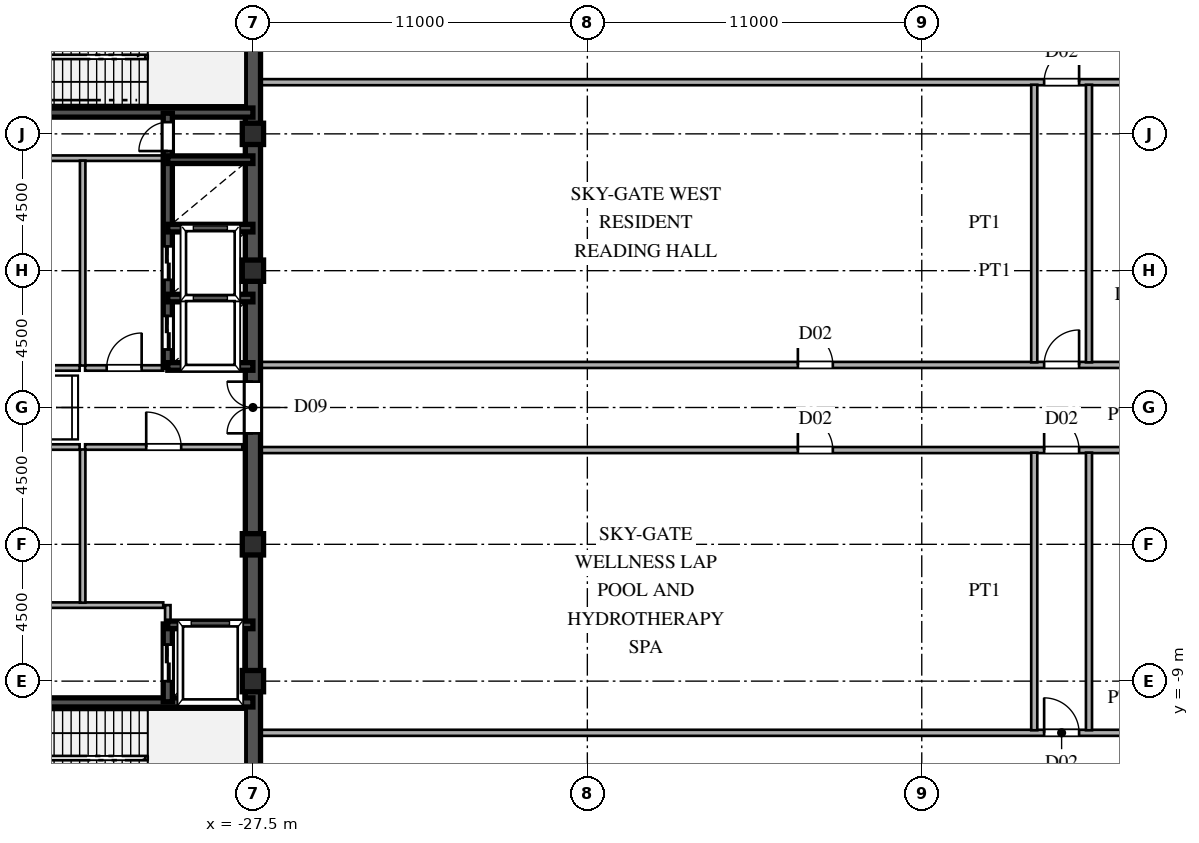
"""IFC4 building model, lengths in metres.
Left out: names, types, materials, properties, quantities, classifications, styles, units other than length and angle.
Written with IfcOpenShell. Run it as: python <this file> out.ifc"""

import sys

from ifc_helpers import new_model, si_unit, direction, frame, frame_2d, origin, origin_2d, place, context, subcontext, project, spatial, rectangle, hollow_rectangle, extrude, source, transform, mapped, element, fill, save


model = new_model("IFC4")
c1 = context("Model", 3, precision=1e-05, world=origin(), true_north=direction((0.0, 1.0)))
c2 = subcontext(c1, "Body", "Model", "MODEL_VIEW")
j1 = project(units=[si_unit("LENGTHUNIT", "METRE"), si_unit("PLANEANGLEUNIT", "RADIAN")], contexts=[c1])
p1 = place(None, origin())
s1 = spatial("IfcSite", under=j1, at=p1, CompositionType="ELEMENT")
p2 = place(p1, origin())
s2 = spatial("IfcBuilding", under=s1, at=p2, CompositionType="ELEMENT")
p3 = place(p2, frame((0.0, 0.0, 229.8)))
s3 = spatial("IfcBuildingStorey", under=s2, at=p3, CompositionType="ELEMENT", Elevation=229.8)
m1 = source(origin(), c2, "Body", "SweptSolid", [
    extrude(hollow_rectangle(XDim=0.7, YDim=0.7, WallThickness=0.03, at=origin_2d()), origin(), (0.0, 0.0, 1.0), 4.8),
])
for number, where, z_axis, x_axis in (
    (1, (-27.5, -9.0, 0.0), (0.0, 0.0, 1.0), (1.0, 0.0, 0.0)),
    (2, (-27.5, -4.5, 0.0), (0.0, 0.0, 1.0), (1.0, 0.0, 0.0)),
    (3, (-27.5, 4.5, 0.0), (0.0, 0.0, 1.0), (1.0, 0.0, 0.0)),
    (4, (-27.5, 9.0, 0.0), (0.0, 0.0, 1.0), (1.0, 0.0, 0.0)),
):
    element("IfcColumn", number, at=place(p3, frame(where, z_axis=z_axis, x_axis=x_axis)), inside=s3, PredefinedType="COLUMN", context=c2, shape_type="MappedRepresentation", body=[
        mapped(m1, transform((0.0, 0.0, 0.0), scale=1.0)),
    ])
for number, where, z_axis, x_axis in (
    (5, (-27.5, -13.5, 0.0), (0.0, 0.0, 1.0), (0.0, 1.0, 0.0)),
    (6, (-27.5, 1.3, 0.0), (0.0, 0.0, 1.0), (0.0, 1.0, 0.0)),
):
    element("IfcWall", number, at=place(p3, frame(where, z_axis=z_axis, x_axis=x_axis)), inside=s3, PredefinedType="SHEAR", context=c2, shape_type="SweptSolid", body=[
        extrude(rectangle(XDim=12.2, YDim=0.5, at=frame_2d((6.1, 0.0))), origin(), (0.0, 0.0, 1.0), 4.54),
    ])
p4 = place(p3, frame((-27.5, -1.3, 0.0), z_axis=(0.0, 0.0, 1.0), x_axis=(0.0, 1.0, 0.0)))
e7 = element("IfcWall", 7, at=p4, inside=s3, PredefinedType="SHEAR", context=c2, shape_type="SweptSolid", body=[
    extrude(rectangle(XDim=2.6, YDim=0.5, at=frame_2d((1.3, 0.0))), origin(), (0.0, 0.0, 1.0), 4.54),
])
p5 = place(p4, frame((0.45, 0.0, 0.0)))
e8 = element("IfcOpeningElement", 8, at=p5, cuts=e7, PredefinedType="OPENING", context=c2, shape_type="SweptSolid", body=[
    extrude(rectangle(XDim=1.7, YDim=2.35, at=frame_2d((0.85, 1.175))), frame((0.0, 0.26, 0.0), z_axis=(0.0, -1.0, 0.0), x_axis=(1.0, 0.0, 0.0)), (0.0, 0.0, 1.0), 0.52),
])
p6 = place(p3, frame((-36.5, -9.7, 0.0), z_axis=(0.0, 0.0, 1.0), x_axis=(1.0, 0.0, 0.0)))
e9 = element("IfcWall", 9, at=p6, inside=s3, PredefinedType="SHEAR", context=c2, shape_type="SweptSolid", body=[
    extrude(rectangle(XDim=9.0, YDim=0.3, at=frame_2d((4.5, 0.0))), origin(), (0.0, 0.0, 1.0), 4.54),
])
p7 = place(p6, frame((0.6, 0.0, 0.0)))
e10 = element("IfcOpeningElement", 10, at=p7, cuts=e9, PredefinedType="OPENING", context=c2, shape_type="SweptSolid", body=[
    extrude(rectangle(XDim=1.1, YDim=2.2, at=frame_2d((0.55, 1.1))), frame((0.0, 0.16, 0.0), z_axis=(0.0, -1.0, 0.0), x_axis=(1.0, 0.0, 0.0)), (0.0, 0.0, 1.0), 0.32),
])
p8 = place(p3, frame((-36.5, 9.7, 0.0), z_axis=(0.0, 0.0, 1.0), x_axis=(1.0, 0.0, 0.0)))
e11 = element("IfcWall", 11, at=p8, inside=s3, PredefinedType="SHEAR", context=c2, shape_type="SweptSolid", body=[
    extrude(rectangle(XDim=9.0, YDim=0.3, at=frame_2d((4.5, 0.0))), origin(), (0.0, 0.0, 1.0), 4.54),
])
p9 = place(p8, frame((0.6, 0.0, 0.0)))
e12 = element("IfcOpeningElement", 12, at=p9, cuts=e11, PredefinedType="OPENING", context=c2, shape_type="SweptSolid", body=[
    extrude(rectangle(XDim=1.1, YDim=2.2, at=frame_2d((0.55, 1.1))), frame((0.0, 0.16, 0.0), z_axis=(0.0, -1.0, 0.0), x_axis=(1.0, 0.0, 0.0)), (0.0, 0.0, 1.0), 0.32),
])
for number, where, z_axis, x_axis in (
    (13, (-30.3, -7.15, 0.0), (0.0, 0.0, 1.0), (1.0, 0.0, 0.0)),
    (14, (-30.3, 1.35, 0.0), (0.0, 0.0, 1.0), (1.0, 0.0, 0.0)),
    (15, (-30.3, 3.6, 0.0), (0.0, 0.0, 1.0), (1.0, 0.0, 0.0)),
    (16, (-30.3, 5.9, 0.0), (0.0, 0.0, 1.0), (1.0, 0.0, 0.0)),
    (17, (-30.3, 8.15, 0.0), (0.0, 0.0, 1.0), (1.0, 0.0, 0.0)),
):
    element("IfcWall", number, at=place(p3, frame(where, z_axis=z_axis, x_axis=x_axis)), inside=s3, PredefinedType="SHEAR", context=c2, shape_type="SweptSolid", body=[
        extrude(rectangle(XDim=2.8, YDim=0.25, at=frame_2d((1.4, 0.0))), origin(), (0.0, 0.0, 1.0), 4.54),
    ])
p10 = place(p3, frame((-30.3, -9.68, 0.0), z_axis=(0.0, 0.0, 1.0), x_axis=(0.0, 1.0, 0.0)))
e18 = element("IfcWall", 18, at=p10, inside=s3, PredefinedType="SHEAR", context=c2, shape_type="SweptSolid", body=[
    extrude(rectangle(XDim=2.56, YDim=0.3, at=frame_2d((1.28, 0.0))), origin(), (0.0, 0.0, 1.0), 4.54),
])
p11 = place(p10, frame((0.68, 0.0, 0.0)))
e19 = element("IfcOpeningElement", 19, at=p11, cuts=e18, PredefinedType="OPENING", context=c2, shape_type="SweptSolid", body=[
    extrude(rectangle(XDim=1.2, YDim=2.25, at=frame_2d((0.6, 1.125))), frame((0.0, 0.16, 0.0), z_axis=(0.0, -1.0, 0.0), x_axis=(1.0, 0.0, 0.0)), (0.0, 0.0, 1.0), 0.32),
])
p12 = place(p3, frame((-30.3, 1.32, 0.0), z_axis=(0.0, 0.0, 1.0), x_axis=(0.0, 1.0, 0.0)))
e20 = element("IfcWall", 20, at=p12, inside=s3, PredefinedType="SHEAR", context=c2, shape_type="SweptSolid", body=[
    extrude(rectangle(XDim=2.28, YDim=0.3, at=frame_2d((1.14, 0.0))), origin(), (0.0, 0.0, 1.0), 4.54),
])
p13 = place(p12, frame((0.59, 0.0, 0.0)))
e21 = element("IfcOpeningElement", 21, at=p13, cuts=e20, PredefinedType="OPENING", context=c2, shape_type="SweptSolid", body=[
    extrude(rectangle(XDim=1.1, YDim=2.2, at=frame_2d((0.55, 1.1))), frame((0.0, 0.16, 0.0), z_axis=(0.0, -1.0, 0.0), x_axis=(1.0, 0.0, 0.0)), (0.0, 0.0, 1.0), 0.32),
])
p14 = place(p3, frame((-30.3, 3.6, 0.0), z_axis=(0.0, 0.0, 1.0), x_axis=(0.0, 1.0, 0.0)))
e22 = element("IfcWall", 22, at=p14, inside=s3, PredefinedType="SHEAR", context=c2, shape_type="SweptSolid", body=[
    extrude(rectangle(XDim=2.3, YDim=0.3, at=frame_2d((1.15, 0.0))), origin(), (0.0, 0.0, 1.0), 4.54),
])
p15 = place(p14, frame((0.6, 0.0, 0.0)))
e23 = element("IfcOpeningElement", 23, at=p15, cuts=e22, PredefinedType="OPENING", context=c2, shape_type="SweptSolid", body=[
    extrude(rectangle(XDim=1.1, YDim=2.2, at=frame_2d((0.55, 1.1))), frame((0.0, 0.16, 0.0), z_axis=(0.0, -1.0, 0.0), x_axis=(1.0, 0.0, 0.0)), (0.0, 0.0, 1.0), 0.32),
])
p16 = place(p3, frame((-30.3, 5.9, 0.0), z_axis=(0.0, 0.0, 1.0), x_axis=(0.0, 1.0, 0.0)))
e24 = element("IfcWall", 24, at=p16, inside=s3, PredefinedType="SHEAR", context=c2, shape_type="SweptSolid", body=[
    extrude(rectangle(XDim=2.25, YDim=0.3, at=frame_2d((1.125, 0.0))), origin(), (0.0, 0.0, 1.0), 4.54),
])
p17 = place(p3, frame((-30.3, 8.15, 0.0), z_axis=(0.0, 0.0, 1.0), x_axis=(0.0, 1.0, 0.0)))
e25 = element("IfcWall", 25, at=p17, inside=s3, PredefinedType="SHEAR", context=c2, shape_type="SweptSolid", body=[
    extrude(rectangle(XDim=1.53, YDim=0.3, at=frame_2d((0.765, 0.0))), origin(), (0.0, 0.0, 1.0), 4.54),
])
p18 = place(p17, frame((0.285, 0.0, 0.0)))
e26 = element("IfcOpeningElement", 26, at=p18, cuts=e25, PredefinedType="OPENING", context=c2, shape_type="SweptSolid", body=[
    extrude(rectangle(XDim=0.95, YDim=2.15, at=frame_2d((0.475, 1.075))), frame((0.0, 0.16, 0.0), z_axis=(0.0, -1.0, 0.0), x_axis=(1.0, 0.0, 0.0)), (0.0, 0.0, 1.0), 0.32),
])
p19 = place(p3, frame((-36.15, -6.5, 0.0), z_axis=(0.0, 0.0, 1.0), x_axis=(1.0, 0.0, 0.0)))
e27 = element("IfcWall", 27, at=p19, inside=s3, PredefinedType="PARTITIONING", context=c2, shape_type="SweptSolid", body=[
    extrude(rectangle(XDim=5.7, YDim=0.18, at=frame_2d((2.85, 0.0))), origin(), (0.0, 0.0, 1.0), 4.54),
])
p20 = place(p3, frame((-30.3, -7.12, 0.0), z_axis=(0.0, 0.0, 1.0), x_axis=(0.0, 1.0, 0.0)))
e28 = element("IfcWall", 28, at=p20, inside=s3, PredefinedType="PARTITIONING", context=c2, shape_type="SweptSolid", body=[
    extrude(rectangle(XDim=0.62, YDim=0.18, at=frame_2d((0.31, 0.0))), origin(), (0.0, 0.0, 1.0), 4.54),
])
p21 = place(p3, frame((-36.15, 8.2, 0.0), z_axis=(0.0, 0.0, 1.0), x_axis=(1.0, 0.0, 0.0)))
e29 = element("IfcWall", 29, at=p21, inside=s3, PredefinedType="PARTITIONING", context=c2, shape_type="SweptSolid", body=[
    extrude(rectangle(XDim=5.7, YDim=0.18, at=frame_2d((2.85, 0.0))), origin(), (0.0, 0.0, 1.0), 4.54),
])
p22 = place(p3, frame((-33.1, -6.42, 0.0), z_axis=(0.0, 0.0, 1.0), x_axis=(0.0, 1.0, 0.0)))
e30 = element("IfcWall", 30, at=p22, inside=s3, PredefinedType="PARTITIONING", context=c2, shape_type="SweptSolid", body=[
    extrude(rectangle(XDim=5.04, YDim=0.18, at=frame_2d((2.52, 0.0))), origin(), (0.0, 0.0, 1.0), 4.54),
])
p23 = place(p3, frame((-33.1, 1.38, 0.0), z_axis=(0.0, 0.0, 1.0), x_axis=(0.0, 1.0, 0.0)))
e31 = element("IfcWall", 31, at=p23, inside=s3, PredefinedType="PARTITIONING", context=c2, shape_type="SweptSolid", body=[
    extrude(rectangle(XDim=6.74, YDim=0.18, at=frame_2d((3.37, 0.0))), origin(), (0.0, 0.0, 1.0), 4.54),
])
p24 = place(p3, frame((-33.02, -1.3, 0.0), z_axis=(0.0, 0.0, 1.0), x_axis=(1.0, 0.0, 0.0)))
e32 = element("IfcWall", 32, at=p24, inside=s3, PredefinedType="PARTITIONING", context=c2, shape_type="SweptSolid", body=[
    extrude(rectangle(XDim=5.17, YDim=0.18, at=frame_2d((2.585, 0.0))), origin(), (0.0, 0.0, 1.0), 4.54),
])
p25 = place(p24, frame((2.01, 0.0, 0.0)))
e33 = element("IfcOpeningElement", 33, at=p25, cuts=e32, PredefinedType="OPENING", context=c2, shape_type="SweptSolid", body=[
    extrude(rectangle(XDim=1.15, YDim=2.2, at=frame_2d((0.575, 1.1))), frame((0.0, 0.1, 0.0), z_axis=(0.0, -1.0, 0.0), x_axis=(1.0, 0.0, 0.0)), (0.0, 0.0, 1.0), 0.2),
])
p26 = place(p3, frame((-33.02, 1.3, 0.0), z_axis=(0.0, 0.0, 1.0), x_axis=(1.0, 0.0, 0.0)))
e34 = element("IfcWall", 34, at=p26, inside=s3, PredefinedType="PARTITIONING", context=c2, shape_type="SweptSolid", body=[
    extrude(rectangle(XDim=2.57, YDim=0.18, at=frame_2d((1.285, 0.0))), origin(), (0.0, 0.0, 1.0), 4.54),
])
p27 = place(p26, frame((0.71, 0.0, 0.0)))
e35 = element("IfcOpeningElement", 35, at=p27, cuts=e34, PredefinedType="OPENING", context=c2, shape_type="SweptSolid", body=[
    extrude(rectangle(XDim=1.15, YDim=2.2, at=frame_2d((0.575, 1.1))), frame((0.0, 0.1, 0.0), z_axis=(0.0, -1.0, 0.0), x_axis=(1.0, 0.0, 0.0)), (0.0, 0.0, 1.0), 0.2),
])
for number, where, z_axis, x_axis in (
    (36, (-36.15, -1.3, 0.0), (0.0, 0.0, 1.0), (1.0, 0.0, 0.0)),
    (37, (-36.15, 1.3, 0.0), (0.0, 0.0, 1.0), (1.0, 0.0, 0.0)),
):
    element("IfcWall", number, at=place(p3, frame(where, z_axis=z_axis, x_axis=x_axis)), inside=s3, PredefinedType="PARTITIONING", context=c2, shape_type="SweptSolid", body=[
        extrude(rectangle(XDim=2.95, YDim=0.18, at=frame_2d((1.475, 0.0))), origin(), (0.0, 0.0, 1.0), 4.54),
    ])
p28 = place(p3, frame((-27.245, -10.7, 0.0), z_axis=(0.0, 0.0, 1.0), x_axis=(1.0, 0.0, 0.0)))
e38 = element("IfcWall", 38, at=p28, inside=s3, PredefinedType="PARTITIONING", context=c2, shape_type="SweptSolid", body=[
    extrude(rectangle(XDim=54.49, YDim=0.2, at=frame_2d((27.245, 0.0))), origin(), (0.0, 0.0, 1.0), 4.54),
])
p29 = place(p28, frame((25.77, 0.0, 0.0)))
e39 = element("IfcOpeningElement", 39, at=p29, cuts=e38, PredefinedType="OPENING", context=c2, shape_type="SweptSolid", body=[
    extrude(rectangle(XDim=1.15, YDim=2.2, at=frame_2d((0.575, 1.1))), frame((0.0, 0.11, 0.0), z_axis=(0.0, -1.0, 0.0), x_axis=(1.0, 0.0, 0.0)), (0.0, 0.0, 1.0), 0.22),
])
p30 = place(p3, frame((-27.245, -1.4, 0.0), z_axis=(0.0, 0.0, 1.0), x_axis=(1.0, 0.0, 0.0)))
e40 = element("IfcWall", 40, at=p30, inside=s3, PredefinedType="PARTITIONING", context=c2, shape_type="SweptSolid", body=[
    extrude(rectangle(XDim=54.49, YDim=0.2, at=frame_2d((27.245, 0.0))), origin(), (0.0, 0.0, 1.0), 4.54),
])
p31 = place(p30, frame((25.77, 0.0, 0.0)))
e41 = element("IfcOpeningElement", 41, at=p31, cuts=e40, PredefinedType="OPENING", context=c2, shape_type="SweptSolid", body=[
    extrude(rectangle(XDim=1.15, YDim=2.2, at=frame_2d((0.575, 1.1))), frame((0.0, 0.11, 0.0), z_axis=(0.0, -1.0, 0.0), x_axis=(1.0, 0.0, 0.0)), (0.0, 0.0, 1.0), 0.22),
])
p32 = place(p30, frame((17.67, 0.0, 0.0)))
e42 = element("IfcOpeningElement", 42, at=p32, cuts=e40, PredefinedType="OPENING", context=c2, shape_type="SweptSolid", body=[
    extrude(rectangle(XDim=1.15, YDim=2.2, at=frame_2d((0.575, 1.1))), frame((0.0, 0.11, 0.0), z_axis=(0.0, -1.0, 0.0), x_axis=(1.0, 0.0, 0.0)), (0.0, 0.0, 1.0), 0.22),
])
p33 = place(p30, frame((35.17, 0.0, 0.0)))
e43 = element("IfcOpeningElement", 43, at=p33, cuts=e40, PredefinedType="OPENING", context=c2, shape_type="SweptSolid", body=[
    extrude(rectangle(XDim=1.15, YDim=2.2, at=frame_2d((0.575, 1.1))), frame((0.0, 0.11, 0.0), z_axis=(0.0, -1.0, 0.0), x_axis=(1.0, 0.0, 0.0)), (0.0, 0.0, 1.0), 0.22),
])
p34 = place(p3, frame((-27.245, 1.4, 0.0), z_axis=(0.0, 0.0, 1.0), x_axis=(1.0, 0.0, 0.0)))
e44 = element("IfcWall", 44, at=p34, inside=s3, PredefinedType="PARTITIONING", context=c2, shape_type="SweptSolid", body=[
    extrude(rectangle(XDim=54.49, YDim=0.2, at=frame_2d((27.245, 0.0))), origin(), (0.0, 0.0, 1.0), 4.54),
])
p35 = place(p34, frame((25.77, 0.0, 0.0)))
e45 = element("IfcOpeningElement", 45, at=p35, cuts=e44, PredefinedType="OPENING", context=c2, shape_type="SweptSolid", body=[
    extrude(rectangle(XDim=1.15, YDim=2.2, at=frame_2d((0.575, 1.1))), frame((0.0, 0.11, 0.0), z_axis=(0.0, -1.0, 0.0), x_axis=(1.0, 0.0, 0.0)), (0.0, 0.0, 1.0), 0.22),
])
p36 = place(p34, frame((35.17, 0.0, 0.0)))
e46 = element("IfcOpeningElement", 46, at=p36, cuts=e44, PredefinedType="OPENING", context=c2, shape_type="SweptSolid", body=[
    extrude(rectangle(XDim=1.15, YDim=2.2, at=frame_2d((0.575, 1.1))), frame((0.0, 0.11, 0.0), z_axis=(0.0, -1.0, 0.0), x_axis=(1.0, 0.0, 0.0)), (0.0, 0.0, 1.0), 0.22),
])
p37 = place(p34, frame((17.67, 0.0, 0.0)))
e47 = element("IfcOpeningElement", 47, at=p37, cuts=e44, PredefinedType="OPENING", context=c2, shape_type="SweptSolid", body=[
    extrude(rectangle(XDim=1.15, YDim=2.2, at=frame_2d((0.575, 1.1))), frame((0.0, 0.11, 0.0), z_axis=(0.0, -1.0, 0.0), x_axis=(1.0, 0.0, 0.0)), (0.0, 0.0, 1.0), 0.22),
])
p38 = place(p34, frame((46.055, 0.0, 0.0)))
e48 = element("IfcOpeningElement", 48, at=p38, cuts=e44, PredefinedType="OPENING", context=c2, shape_type="SweptSolid", body=[
    extrude(rectangle(XDim=0.88, YDim=2.1, at=frame_2d((0.44, 1.05))), frame((0.0, 0.11, 0.0), z_axis=(0.0, -1.0, 0.0), x_axis=(1.0, 0.0, 0.0)), (0.0, 0.0, 1.0), 0.22),
])
p39 = place(p34, frame((51.405, 0.0, 0.0)))
e49 = element("IfcOpeningElement", 49, at=p39, cuts=e44, PredefinedType="OPENING", context=c2, shape_type="SweptSolid", body=[
    extrude(rectangle(XDim=0.88, YDim=2.1, at=frame_2d((0.44, 1.05))), frame((0.0, 0.11, 0.0), z_axis=(0.0, -1.0, 0.0), x_axis=(1.0, 0.0, 0.0)), (0.0, 0.0, 1.0), 0.22),
])
p40 = place(p3, frame((-27.245, 10.7, 0.0), z_axis=(0.0, 0.0, 1.0), x_axis=(1.0, 0.0, 0.0)))
e50 = element("IfcWall", 50, at=p40, inside=s3, PredefinedType="PARTITIONING", context=c2, shape_type="SweptSolid", body=[
    extrude(rectangle(XDim=54.49, YDim=0.2, at=frame_2d((27.245, 0.0))), origin(), (0.0, 0.0, 1.0), 4.54),
])
p41 = place(p40, frame((25.77, 0.0, 0.0)))
e51 = element("IfcOpeningElement", 51, at=p41, cuts=e50, PredefinedType="OPENING", context=c2, shape_type="SweptSolid", body=[
    extrude(rectangle(XDim=1.15, YDim=2.2, at=frame_2d((0.575, 1.1))), frame((0.0, 0.11, 0.0), z_axis=(0.0, -1.0, 0.0), x_axis=(1.0, 0.0, 0.0)), (0.0, 0.0, 1.0), 0.22),
])
for number, where, z_axis, x_axis in (
    (52, (-1.8, -10.615, 0.0), (0.0, 0.0, 1.0), (0.0, 1.0, 0.0)),
    (53, (-1.8, 1.485, 0.0), (0.0, 0.0, 1.0), (0.0, 1.0, 0.0)),
):
    element("IfcWall", number, at=place(p3, frame(where, z_axis=z_axis, x_axis=x_axis)), inside=s3, PredefinedType="PARTITIONING", context=c2, shape_type="SweptSolid", body=[
        extrude(rectangle(XDim=9.13, YDim=0.2, at=frame_2d((4.565, 0.0))), origin(), (0.0, 0.0, 1.0), 4.54),
    ])
p42 = place(p3, frame((0.0, -10.615, 0.0), z_axis=(0.0, 0.0, 1.0), x_axis=(0.0, 1.0, 0.0)))
e54 = element("IfcWall", 54, at=p42, inside=s3, PredefinedType="PARTITIONING", context=c2, shape_type="SweptSolid", body=[
    extrude(rectangle(XDim=7.635, YDim=0.2, at=frame_2d((3.817, 0.0))), origin(), (0.0, 0.0, 1.0), 3.44),
])
for number, where, z_axis, x_axis in (
    (55, (0.0, -2.98, 0.0), (0.0, 0.0, 1.0), (0.0, 1.0, 0.0)),
    (56, (0.0, 1.485, 0.0), (0.0, 0.0, 1.0), (0.0, 1.0, 0.0)),
):
    element("IfcWall", number, at=place(p3, frame(where, z_axis=z_axis, x_axis=x_axis)), inside=s3, PredefinedType="PARTITIONING", context=c2, shape_type="SweptSolid", body=[
        extrude(rectangle(XDim=1.495, YDim=0.2, at=frame_2d((0.748, 0.0))), origin(), (0.0, 0.0, 1.0), 4.54),
    ])
p43 = place(p3, frame((0.0, 2.98, 0.0), z_axis=(0.0, 0.0, 1.0), x_axis=(0.0, 1.0, 0.0)))
e57 = element("IfcWall", 57, at=p43, inside=s3, PredefinedType="PARTITIONING", context=c2, shape_type="SweptSolid", body=[
    extrude(rectangle(XDim=7.635, YDim=0.2, at=frame_2d((3.817, 0.0))), origin(), (0.0, 0.0, 1.0), 3.44),
])
m2 = source(origin(), c2, "Body", "SweptSolid", [
    extrude(rectangle(XDim=1.7, YDim=2.35, at=frame_2d((0.85, 1.175))), frame((0.0, 0.025, 0.0), z_axis=(0.0, -1.0, 0.0), x_axis=(1.0, 0.0, 0.0)), (0.0, 0.0, 1.0), 0.05),
])
p44 = place(p5, origin())
e58 = element("IfcDoor", 58, at=p44, inside=s3, OperationType="DOUBLE_SWING_LEFT", PredefinedType="DOOR", context=c2, shape_type="MappedRepresentation", body=[
    mapped(m2, transform((0.0, 0.0, 0.0), scale=1.0)),
])
fill(e8, e58)
m3 = source(origin(), c2, "Body", "SweptSolid", [
    extrude(rectangle(XDim=1.2, YDim=2.25, at=frame_2d((0.6, 1.125))), frame((0.0, 0.025, 0.0), z_axis=(0.0, -1.0, 0.0), x_axis=(1.0, 0.0, 0.0)), (0.0, 0.0, 1.0), 0.05),
])
p45 = place(p11, origin())
e59 = element("IfcDoor", 59, at=p45, inside=s3, OperationType="DOUBLE_DOOR_SLIDING", PredefinedType="DOOR", context=c2, shape_type="MappedRepresentation", body=[
    mapped(m3, transform((0.0, 0.0, 0.0), scale=1.0)),
])
fill(e19, e59)
m4 = source(origin(), c2, "Body", "SweptSolid", [
    extrude(rectangle(XDim=1.1, YDim=2.2, at=frame_2d((0.55, 1.1))), frame((0.0, 0.025, 0.0), z_axis=(0.0, -1.0, 0.0), x_axis=(1.0, 0.0, 0.0)), (0.0, 0.0, 1.0), 0.05),
])
p46 = place(p13, origin())
e60 = element("IfcDoor", 60, at=p46, inside=s3, OperationType="DOUBLE_DOOR_SLIDING", PredefinedType="DOOR", context=c2, shape_type="MappedRepresentation", body=[
    mapped(m4, transform((0.0, 0.0, 0.0), scale=1.0)),
])
fill(e21, e60)
p47 = place(p15, origin())
e61 = element("IfcDoor", 61, at=p47, inside=s3, OperationType="DOUBLE_DOOR_SLIDING", PredefinedType="DOOR", context=c2, shape_type="MappedRepresentation", body=[
    mapped(m4, transform((0.0, 0.0, 0.0), scale=1.0)),
])
fill(e23, e61)
m5 = source(origin(), c2, "Body", "SweptSolid", [
    extrude(rectangle(XDim=0.95, YDim=2.15, at=frame_2d((0.475, 1.075))), frame((0.0, 0.025, 0.0), z_axis=(0.0, -1.0, 0.0), x_axis=(1.0, 0.0, 0.0)), (0.0, 0.0, 1.0), 0.05),
])
p48 = place(p18, origin())
e62 = element("IfcDoor", 62, at=p48, inside=s3, OperationType="SINGLE_SWING_LEFT", PredefinedType="DOOR", context=c2, shape_type="MappedRepresentation", body=[
    mapped(m5, transform((0.0, 0.0, 0.0), scale=1.0)),
])
fill(e26, e62)
m6 = source(origin(), c2, "Body", "SweptSolid", [
    extrude(rectangle(XDim=1.15, YDim=2.2, at=frame_2d((0.575, 1.1))), frame((0.0, 0.025, 0.0), z_axis=(0.0, -1.0, 0.0), x_axis=(1.0, 0.0, 0.0)), (0.0, 0.0, 1.0), 0.05),
])
p49 = place(p25, origin())
e63 = element("IfcDoor", 63, at=p49, inside=s3, OperationType="SINGLE_SWING_LEFT", PredefinedType="DOOR", context=c2, shape_type="MappedRepresentation", body=[
    mapped(m6, transform((0.0, 0.0, 0.0), scale=1.0)),
])
fill(e33, e63)
p50 = place(p27, origin())
e64 = element("IfcDoor", 64, at=p50, inside=s3, OperationType="SINGLE_SWING_RIGHT", PredefinedType="DOOR", context=c2, shape_type="MappedRepresentation", body=[
    mapped(m6, transform((0.0, 0.0, 0.0), scale=1.0)),
])
fill(e35, e64)
p51 = place(p29, origin())
e65 = element("IfcDoor", 65, at=p51, inside=s3, OperationType="SINGLE_SWING_LEFT", PredefinedType="DOOR", context=c2, shape_type="MappedRepresentation", body=[
    mapped(m6, transform((0.0, 0.0, 0.0), scale=1.0)),
])
fill(e39, e65)
p52 = place(p31, origin())
e66 = element("IfcDoor", 66, at=p52, inside=s3, OperationType="SINGLE_SWING_LEFT", PredefinedType="DOOR", context=c2, shape_type="MappedRepresentation", body=[
    mapped(m6, transform((0.0, 0.0, 0.0), scale=1.0)),
])
fill(e41, e66)
p53 = place(p32, origin())
e67 = element("IfcDoor", 67, at=p53, inside=s3, OperationType="SINGLE_SWING_LEFT", PredefinedType="DOOR", context=c2, shape_type="MappedRepresentation", body=[
    mapped(m6, transform((0.0, 0.0, 0.0), scale=1.0)),
])
fill(e42, e67)
p54 = place(p35, origin())
e68 = element("IfcDoor", 68, at=p54, inside=s3, OperationType="SINGLE_SWING_RIGHT", PredefinedType="DOOR", context=c2, shape_type="MappedRepresentation", body=[
    mapped(m6, transform((0.0, 0.0, 0.0), scale=1.0)),
])
fill(e45, e68)
p55 = place(p37, origin())
e69 = element("IfcDoor", 69, at=p55, inside=s3, OperationType="SINGLE_SWING_LEFT", PredefinedType="DOOR", context=c2, shape_type="MappedRepresentation", body=[
    mapped(m6, transform((0.0, 0.0, 0.0), scale=1.0)),
])
fill(e47, e69)
p56 = place(p41, origin())
e70 = element("IfcDoor", 70, at=p56, inside=s3, OperationType="SINGLE_SWING_RIGHT", PredefinedType="DOOR", context=c2, shape_type="MappedRepresentation", body=[
    mapped(m6, transform((0.0, 0.0, 0.0), scale=1.0)),
])
fill(e51, e70)
save(model, sys.argv[1])
